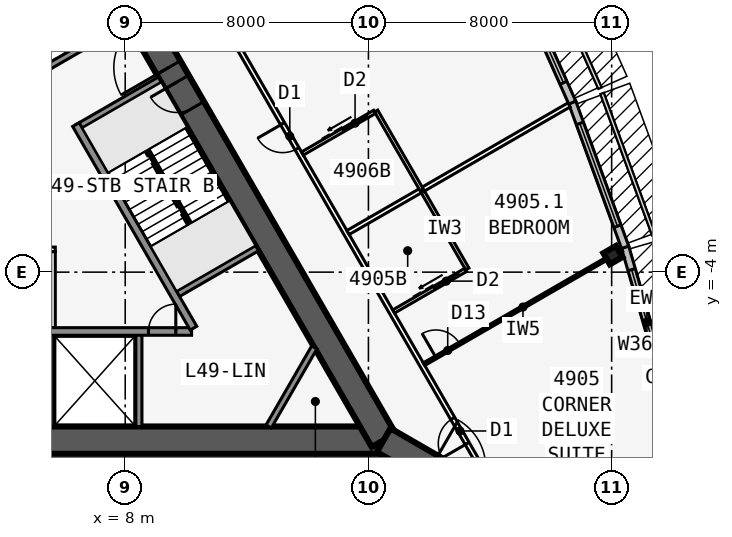
"""IFC4 building model, lengths in metres.
Left out: names, types, materials, properties, quantities, classifications, styles, units other than length and angle.
Written with IfcOpenShell. Run it as: python <this file> out.ifc"""

import sys

from ifc_helpers import new_model, si_unit, direction, frame, frame_2d, origin, origin_2d, place, context, subcontext, project, spatial, rectangle, i_section, extrude, element, fill, save


model = new_model("IFC4")
c1 = context("Model", 3, precision=1e-05, world=origin(), true_north=direction((0.0, 1.0)))
c2 = subcontext(c1, "Body", "Model", "MODEL_VIEW")
j1 = project(units=[si_unit("LENGTHUNIT", "METRE"), si_unit("PLANEANGLEUNIT", "RADIAN")], contexts=[c1])
p1 = place(None, origin())
s1 = spatial("IfcSite", under=j1, at=p1, CompositionType="ELEMENT")
p2 = place(p1, origin())
s2 = spatial("IfcBuilding", under=s1, at=p2, CompositionType="ELEMENT")
p3 = place(p2, frame((0.0, 0.0, 182.7)))
s3 = spatial("IfcBuildingStorey", under=s2, at=p3, CompositionType="ELEMENT", Elevation=182.7)
p4 = place(p3, frame((-16.5, -9.526, 0.0), z_axis=(0.0, 0.0, 1.0), x_axis=(1.0, 0.0, 0.0)))
e1 = element("IfcWall", 1, at=p4, inside=s3, PredefinedType="SHEAR", context=c2, shape_type="SweptSolid", body=[
    extrude(rectangle(XDim=33.0, YDim=0.9, at=frame_2d((16.5, 0.0))), origin(), (0.0, 0.0, 1.0), 3.4),
])
p5 = place(p4, frame((14.05, 0.0, 0.0)))
e2 = element("IfcOpeningElement", 2, at=p5, cuts=e1, PredefinedType="OPENING", context=c2, shape_type="SweptSolid", body=[
    extrude(rectangle(XDim=1.8, YDim=2.13, at=frame_2d((0.9, 1.065))), frame((0.0, 0.46, 0.0), z_axis=(0.0, -1.0, 0.0), x_axis=(1.0, 0.0, 0.0)), (0.0, 0.0, 1.0), 0.92),
])
p6 = place(p3, frame((-0.55, -5.951, 0.0), z_axis=(0.0, 0.0, 1.0), x_axis=(1.0, 0.0, 0.0)))
e3 = element("IfcWall", 3, at=p6, inside=s3, PredefinedType="SOLIDWALL", context=c2, shape_type="SweptSolid", body=[
    extrude(rectangle(XDim=10.733, YDim=0.25, at=frame_2d((5.366, 0.0))), origin(), (0.0, 0.0, 1.0), 3.235),
])
p7 = place(p6, frame((9.314, 0.0, 0.0)))
e4 = element("IfcOpeningElement", 4, at=p7, cuts=e3, PredefinedType="OPENING", context=c2, shape_type="SweptSolid", body=[
    extrude(rectangle(XDim=0.9, YDim=2.13, at=frame_2d((0.45, 1.065))), frame((0.0, 0.135, 0.0), z_axis=(0.0, -1.0, 0.0), x_axis=(1.0, 0.0, 0.0)), (0.0, 0.0, 1.0), 0.27),
])
p8 = place(p6, frame((1.05, 0.0, 0.0)))
e5 = element("IfcOpeningElement", 5, at=p8, cuts=e3, PredefinedType="OPENING", context=c2, shape_type="SweptSolid", body=[
    extrude(rectangle(XDim=1.1, YDim=2.13, at=frame_2d((0.55, 1.065))), frame((0.0, 0.135, 0.0), z_axis=(0.0, -1.0, 0.0), x_axis=(1.0, 0.0, 0.0)), (0.0, 0.0, 1.0), 0.27),
])
p9 = place(p6, frame((4.05, 0.0, 0.0)))
e6 = element("IfcOpeningElement", 6, at=p9, cuts=e3, PredefinedType="OPENING", context=c2, shape_type="SweptSolid", body=[
    extrude(rectangle(XDim=1.1, YDim=2.13, at=frame_2d((0.55, 1.065))), frame((0.0, 0.135, 0.0), z_axis=(0.0, -1.0, 0.0), x_axis=(1.0, 0.0, 0.0)), (0.0, 0.0, 1.0), 0.27),
])
for number, where, z_axis, x_axis in (
    (7, (5.55, -5.951, 0.0), (0.0, 0.0, 1.0), (0.0, -1.0, 0.0)),
    (8, (8.45, -5.951, 0.0), (0.0, 0.0, 1.0), (0.0, -1.0, 0.0)),
):
    element("IfcWall", number, at=place(p3, frame(where, z_axis=z_axis, x_axis=x_axis)), inside=s3, PredefinedType="SOLIDWALL", context=c2, shape_type="SweptSolid", body=[
        extrude(rectangle(XDim=3.125, YDim=0.2, at=frame_2d((1.562, 0.0))), origin(), (0.0, 0.0, 1.0), 3.235),
    ])
p10 = place(p3, frame((16.5, -9.526, 0.0), z_axis=(0.0, 0.0, 1.0), x_axis=(-0.499999749417, 0.866025548458, 0.0)))
e9 = element("IfcWall", 9, at=p10, inside=s3, PredefinedType="SHEAR", context=c2, shape_type="SweptSolid", body=[
    extrude(rectangle(XDim=33.0, YDim=0.9, at=frame_2d((16.5, 0.0))), origin(), (0.0, 0.0, 1.0), 3.4),
])
p11 = place(p10, frame((14.15, 0.0, 0.0)))
e10 = element("IfcOpeningElement", 10, at=p11, cuts=e9, PredefinedType="OPENING", context=c2, shape_type="SweptSolid", body=[
    extrude(rectangle(XDim=1.8, YDim=2.13, at=frame_2d((0.9, 1.065))), frame((0.0, 0.46, 0.0), z_axis=(0.0, -1.0, 0.0), x_axis=(1.0, 0.0, 0.0)), (0.0, 0.0, 1.0), 0.92),
])
p12 = place(p10, frame((12.6, 0.0, 0.0)))
e11 = element("IfcOpeningElement", 11, at=p12, cuts=e9, PredefinedType="OPENING", context=c2, shape_type="SweptSolid", body=[
    extrude(rectangle(XDim=1.0, YDim=2.13, at=frame_2d((0.5, 1.065))), frame((0.0, 0.46, 0.0), z_axis=(0.0, -1.0, 0.0), x_axis=(1.0, 0.0, 0.0)), (0.0, 0.0, 1.0), 0.92),
])
p13 = place(p3, frame((10.245, -5.843, 0.0), z_axis=(0.0, 0.0, 1.0), x_axis=(-0.499993009313, 0.866029439822, 0.0)))
e12 = element("IfcWall", 12, at=p13, inside=s3, PredefinedType="SOLIDWALL", context=c2, shape_type="SweptSolid", body=[
    extrude(rectangle(XDim=7.733, YDim=0.25, at=frame_2d((3.866, 0.0))), origin(), (0.0, 0.0, 1.0), 3.235),
])
for number, where, z_axis, x_axis in (
    (13, (9.629, -4.775, 0.0), (0.0, 0.0, 1.0), (0.866, 0.5, 0.0)),
    (14, (6.429, 0.767, 0.0), (0.0, 0.0, 1.0), (0.866, 0.5, 0.0)),
    (15, (5.329, 2.673, 0.0), (0.0, 0.0, 1.0), (0.866, 0.5, 0.0)),
):
    element("IfcWall", number, at=place(p3, frame(where, z_axis=z_axis, x_axis=x_axis)), inside=s3, PredefinedType="SOLIDWALL", context=c2, shape_type="SweptSolid", body=[
        extrude(rectangle(XDim=3.125, YDim=0.2, at=frame_2d((1.562, 0.0))), origin(), (0.0, 0.0, 1.0), 3.235),
    ])
p14 = place(p3, frame((16.5, -9.526, 0.0), z_axis=(0.0, 0.0, 1.0), x_axis=(0.866031398331, -0.499989616998, 0.0)))
e16 = element("IfcWall", 16, at=p14, inside=s3, PredefinedType="SHEAR", context=c2, shape_type="SweptSolid", body=[
    extrude(rectangle(XDim=4.746, YDim=0.9, at=frame_2d((2.373, 0.0))), origin(), (0.0, 0.0, 1.0), 3.4),
])
p15 = place(p14, frame((1.8, 0.0, 0.0)))
e17 = element("IfcOpeningElement", 17, at=p15, cuts=e16, PredefinedType="OPENING", context=c2, shape_type="SweptSolid", body=[
    extrude(rectangle(XDim=1.8, YDim=2.13, at=frame_2d((0.9, 1.065))), frame((0.0, 0.46, 0.0), z_axis=(0.0, -1.0, 0.0), x_axis=(1.0, 0.0, 0.0)), (0.0, 0.0, 1.0), 0.92),
])
p16 = place(p3, frame((24.041, -3.44, 0.0), z_axis=(0.0, 0.0, 1.0), x_axis=(-0.5, 0.866025403784, 0.0)))
e18 = element("IfcColumn", 18, at=p16, inside=s3, PredefinedType="COLUMN", context=c2, shape_type="SweptSolid", body=[
    extrude(i_section(OverallWidth=0.424, OverallDepth=0.475, WebThickness=0.048, FlangeThickness=0.077, at=origin_2d()), origin(), (0.0, 0.0, 1.0), 3.4),
])
p17 = place(p3, frame((25.88, -8.118, 0.0), z_axis=(0.0, 0.0, 1.0), x_axis=(-0.279528287117, 0.960137457191, 0.0)))
e19 = element("IfcWall", 19, at=p17, inside=s3, PredefinedType="STANDARD", context=c2, shape_type="SweptSolid", body=[
    extrude(rectangle(XDim=5.148, YDim=0.25, at=frame_2d((2.574, 0.0))), origin(), (0.0, 0.0, 1.0), 3.235),
])
p18 = place(p17, frame((0.774, 0.0, 0.45)))
e20 = element("IfcOpeningElement", 20, at=p18, cuts=e19, PredefinedType="OPENING", context=c2, shape_type="SweptSolid", body=[
    extrude(rectangle(XDim=3.6, YDim=2.4, at=frame_2d((1.8, 1.2))), frame((0.0, 0.135, 0.0), z_axis=(0.0, -1.0, 0.0), x_axis=(1.0, 0.0, 0.0)), (0.0, 0.0, 1.0), 0.27),
])
p19 = place(p3, frame((24.444, -3.183, 0.0), z_axis=(0.0, 0.0, 1.0), x_axis=(-0.343225593282, 0.939252996863, 0.0)))
e21 = element("IfcWall", 21, at=p19, inside=s3, PredefinedType="STANDARD", context=c2, shape_type="SweptSolid", body=[
    extrude(rectangle(XDim=5.076, YDim=0.25, at=frame_2d((2.538, 0.0))), origin(), (0.0, 0.0, 1.0), 3.235),
])
p20 = place(p19, frame((0.738, 0.0, 0.45)))
e22 = element("IfcOpeningElement", 22, at=p20, cuts=e21, PredefinedType="OPENING", context=c2, shape_type="SweptSolid", body=[
    extrude(rectangle(XDim=3.6, YDim=2.4, at=frame_2d((1.8, 1.2))), frame((0.0, 0.135, 0.0), z_axis=(0.0, -1.0, 0.0), x_axis=(1.0, 0.0, 0.0)), (0.0, 0.0, 1.0), 0.27),
])
p21 = place(p3, frame((22.705, 1.576, 0.0), z_axis=(0.0, 0.0, 1.0), x_axis=(-0.406832200364, 0.913502906808, 0.0)))
e23 = element("IfcWall", 23, at=p21, inside=s3, PredefinedType="STANDARD", context=c2, shape_type="SweptSolid", body=[
    extrude(rectangle(XDim=5.028, YDim=0.25, at=frame_2d((2.514, 0.0))), origin(), (0.0, 0.0, 1.0), 3.235),
])
p22 = place(p21, frame((0.714, 0.0, 0.45)))
e24 = element("IfcOpeningElement", 24, at=p22, cuts=e23, PredefinedType="OPENING", context=c2, shape_type="SweptSolid", body=[
    extrude(rectangle(XDim=3.6, YDim=2.4, at=frame_2d((1.8, 1.2))), frame((0.0, 0.135, 0.0), z_axis=(0.0, -1.0, 0.0), x_axis=(1.0, 0.0, 0.0)), (0.0, 0.0, 1.0), 0.27),
])
p23 = place(p3, frame((20.027, -10.985, 0.0), z_axis=(0.0, 0.0, 1.0), x_axis=(-0.500001677587, 0.866024435227, 0.0)))
e25 = element("IfcWall", 25, at=p23, inside=s3, PredefinedType="PARTITIONING", context=c2, shape_type="SweptSolid", body=[
    extrude(rectangle(XDim=39.054, YDim=0.15, at=frame_2d((19.527, 0.0))), origin(), (0.0, 0.0, 1.0), 3.235),
])
p24 = place(p23, frame((1.558, 0.0, 0.0)))
e26 = element("IfcOpeningElement", 26, at=p24, cuts=e25, PredefinedType="OPENING", context=c2, shape_type="SweptSolid", body=[
    extrude(rectangle(XDim=0.95, YDim=2.13, at=frame_2d((0.475, 1.065))), frame((0.0, 0.085, 0.0), z_axis=(0.0, -1.0, 0.0), x_axis=(1.0, 0.0, 0.0)), (0.0, 0.0, 1.0), 0.17),
])
p25 = place(p23, frame((12.752, 0.0, 0.0)))
e27 = element("IfcOpeningElement", 27, at=p25, cuts=e25, PredefinedType="OPENING", context=c2, shape_type="SweptSolid", body=[
    extrude(rectangle(XDim=0.95, YDim=2.13, at=frame_2d((0.475, 1.065))), frame((0.0, 0.085, 0.0), z_axis=(0.0, -1.0, 0.0), x_axis=(1.0, 0.0, 0.0)), (0.0, 0.0, 1.0), 0.17),
])
p26 = place(p23, frame((26.552, 0.0, 0.0)))
e28 = element("IfcOpeningElement", 28, at=p26, cuts=e25, PredefinedType="OPENING", context=c2, shape_type="SweptSolid", body=[
    extrude(rectangle(XDim=0.95, YDim=2.13, at=frame_2d((0.475, 1.065))), frame((0.0, 0.085, 0.0), z_axis=(0.0, -1.0, 0.0), x_axis=(1.0, 0.0, 0.0)), (0.0, 0.0, 1.0), 0.17),
])
p27 = place(p23, frame((37.752, 0.0, 0.0)))
e29 = element("IfcOpeningElement", 29, at=p27, cuts=e25, PredefinedType="OPENING", context=c2, shape_type="SweptSolid", body=[
    extrude(rectangle(XDim=0.95, YDim=2.13, at=frame_2d((0.475, 1.065))), frame((0.0, 0.085, 0.0), z_axis=(0.0, -1.0, 0.0), x_axis=(1.0, 0.0, 0.0)), (0.0, 0.0, 1.0), 0.17),
])
p28 = place(p3, frame((17.829, -7.027, 0.0), z_axis=(0.0, 0.0, 1.0), x_axis=(0.866029804378, 0.499992377871, 0.0)))
e30 = element("IfcWall", 30, at=p28, inside=s3, PredefinedType="PARTITIONING", context=c2, shape_type="SweptSolid", body=[
    extrude(rectangle(XDim=7.516, YDim=0.1, at=frame_2d((3.758, 0.0))), origin(), (0.0, 0.0, 1.0), 2.389),
])
p29 = place(p28, frame((0.45, 0.0, 0.0)))
e31 = element("IfcOpeningElement", 31, at=p29, cuts=e30, PredefinedType="OPENING", context=c2, shape_type="SweptSolid", body=[
    extrude(rectangle(XDim=0.9, YDim=2.13, at=frame_2d((0.45, 1.065))), frame((0.0, 0.06, 0.0), z_axis=(0.0, -1.0, 0.0), x_axis=(1.0, 0.0, 0.0)), (0.0, 0.0, 1.0), 0.12),
])
p30 = place(p3, frame((15.329, -2.697, 0.0), z_axis=(0.0, 0.0, 1.0), x_axis=(0.866024316602, 0.50000188305, 0.0)))
e32 = element("IfcWall", 32, at=p30, inside=s3, PredefinedType="PARTITIONING", context=c2, shape_type="SweptSolid", body=[
    extrude(rectangle(XDim=8.395, YDim=0.15, at=frame_2d((4.198, 0.0))), origin(), (0.0, 0.0, 1.0), 2.389),
])
p31 = place(p3, frame((19.253, -3.895, 0.0), z_axis=(0.0, 0.0, 1.0), x_axis=(-0.499990139034, 0.866031096941, 0.0)))
e33 = element("IfcWall", 33, at=p31, inside=s3, PredefinedType="PLUMBINGWALL", context=c2, shape_type="SweptSolid", body=[
    extrude(rectangle(XDim=3.0, YDim=0.12, at=frame_2d((1.5, 0.0))), origin(), (0.0, 0.0, 1.0), 3.235),
])
p32 = place(p3, frame((16.829, -5.295, 0.0), z_axis=(0.0, 0.0, 1.0), x_axis=(0.866035715982, 0.499982138324, 0.0)))
e34 = element("IfcWall", 34, at=p32, inside=s3, PredefinedType="PLUMBINGWALL", context=c2, shape_type="SweptSolid", body=[
    extrude(rectangle(XDim=2.74, YDim=0.12, at=frame_2d((1.37, 0.0))), origin(), (0.0, 0.0, 1.0), 3.235),
])
p33 = place(p32, frame((1.55, 0.0, 0.0)))
e35 = element("IfcOpeningElement", 35, at=p33, cuts=e34, PredefinedType="OPENING", context=c2, shape_type="SweptSolid", body=[
    extrude(rectangle(XDim=0.9, YDim=2.13, at=frame_2d((0.45, 1.065))), frame((0.0, 0.07, 0.0), z_axis=(0.0, -1.0, 0.0), x_axis=(1.0, 0.0, 0.0)), (0.0, 0.0, 1.0), 0.14),
])
p34 = place(p3, frame((17.753, -1.297, 0.0), z_axis=(0.0, 0.0, 1.0), x_axis=(-0.499990139034, 0.866031096941, 0.0)))
e36 = element("IfcWall", 36, at=p34, inside=s3, PredefinedType="PLUMBINGWALL", context=c2, shape_type="SweptSolid", body=[
    extrude(rectangle(XDim=3.0, YDim=0.12, at=frame_2d((1.5, 0.0))), origin(), (0.0, 0.0, 1.0), 3.235),
])
p35 = place(p3, frame((13.829, -0.099, 0.0), z_axis=(0.0, 0.0, 1.0), x_axis=(0.865997131366, 0.500048966069, 0.0)))
e37 = element("IfcWall", 37, at=p35, inside=s3, PredefinedType="PLUMBINGWALL", context=c2, shape_type="SweptSolid", body=[
    extrude(rectangle(XDim=2.74, YDim=0.12, at=frame_2d((1.37, 0.0))), origin(), (0.0, 0.0, 1.0), 3.235),
])
p36 = place(p35, frame((1.55, 0.0, 0.0)))
e38 = element("IfcOpeningElement", 38, at=p36, cuts=e37, PredefinedType="OPENING", context=c2, shape_type="SweptSolid", body=[
    extrude(rectangle(XDim=0.9, YDim=2.13, at=frame_2d((0.45, 1.065))), frame((0.0, 0.07, 0.0), z_axis=(0.0, -1.0, 0.0), x_axis=(1.0, 0.0, 0.0)), (0.0, 0.0, 1.0), 0.14),
])
p37 = place(p3, frame((-2.65, -3.251, 0.0), z_axis=(0.0, 0.0, 1.0), x_axis=(1.0, 0.0, 0.0)))
e39 = element("IfcWall", 39, at=p37, inside=s3, PredefinedType="PARTITIONING", context=c2, shape_type="SweptSolid", body=[
    extrude(rectangle(XDim=8.35, YDim=0.15, at=frame_2d((4.175, 0.0))), origin(), (0.0, 0.0, 1.0), 3.235),
])
p38 = place(p3, frame((5.625, -5.826, 0.0), z_axis=(0.0, 0.0, 1.0), x_axis=(0.0, 1.0, 0.0)))
e40 = element("IfcWall", 40, at=p38, inside=s3, PredefinedType="PARTITIONING", context=c2, shape_type="SweptSolid", body=[
    extrude(rectangle(XDim=2.5, YDim=0.15, at=frame_2d((1.25, 0.0))), origin(), (0.0, 0.0, 1.0), 3.235),
])
p39 = place(p3, frame((14.219, -6.476, 0.0), z_axis=(0.0, 0.0, 1.0), x_axis=(-0.499952404951, -0.866052881055, 0.0)))
e41 = element("IfcWall", 41, at=p39, inside=s3, PredefinedType="SOLIDWALL", context=c2, shape_type="SweptSolid", body=[
    extrude(rectangle(XDim=3.002, YDim=0.2, at=frame_2d((1.501, 0.0))), origin(), (0.0, 0.0, 1.0), 3.235),
])
p40 = place(p3, frame((10.135, -2.401, 0.0), z_axis=(0.0, 0.0, 1.0), x_axis=(-0.499992232847, 0.866029888106, 0.0)))
e42 = element("IfcWall", 42, at=p40, inside=s3, PredefinedType="SOLIDWALL", context=c2, shape_type="SweptSolid", body=[
    extrude(rectangle(XDim=2.794, YDim=0.1, at=frame_2d((1.397, 0.0))), origin(), (0.0, 0.0, 1.0), 3.4),
])
p41 = place(p18, origin())
e43 = element("IfcWindow", 43, at=p41, inside=s3, PartitioningType="SINGLE_PANEL", PredefinedType="WINDOW", context=c2, shape_type="SweptSolid", body=[
    extrude(rectangle(XDim=3.6, YDim=2.4, at=frame_2d((1.8, 1.2))), frame((0.0, 0.03, 0.0), z_axis=(0.0, -1.0, 0.0), x_axis=(1.0, 0.0, 0.0)), (0.0, 0.0, 1.0), 0.06),
])
fill(e20, e43)
p42 = place(p20, origin())
e44 = element("IfcWindow", 44, at=p42, inside=s3, PartitioningType="SINGLE_PANEL", PredefinedType="WINDOW", context=c2, shape_type="SweptSolid", body=[
    extrude(rectangle(XDim=3.6, YDim=2.4, at=frame_2d((1.8, 1.2))), frame((0.0, 0.03, 0.0), z_axis=(0.0, -1.0, 0.0), x_axis=(1.0, 0.0, 0.0)), (0.0, 0.0, 1.0), 0.06),
])
fill(e22, e44)
p43 = place(p22, origin())
e45 = element("IfcWindow", 45, at=p43, inside=s3, PartitioningType="SINGLE_PANEL", PredefinedType="WINDOW", context=c2, shape_type="SweptSolid", body=[
    extrude(rectangle(XDim=3.6, YDim=2.4, at=frame_2d((1.8, 1.2))), frame((0.0, 0.03, 0.0), z_axis=(0.0, -1.0, 0.0), x_axis=(1.0, 0.0, 0.0)), (0.0, 0.0, 1.0), 0.06),
])
fill(e24, e45)
p44 = place(p29, origin())
e46 = element("IfcDoor", 46, at=p44, inside=s3, OperationType="SINGLE_SWING_LEFT", PredefinedType="DOOR", context=c2, shape_type="SweptSolid", body=[
    extrude(rectangle(XDim=0.9, YDim=2.13, at=frame_2d((0.45, 1.065))), frame((0.0, 0.025, 0.0), z_axis=(0.0, -1.0, 0.0), x_axis=(1.0, 0.0, 0.0)), (0.0, 0.0, 1.0), 0.05),
])
fill(e31, e46)
p45 = place(p24, origin())
e47 = element("IfcDoor", 47, at=p45, inside=s3, OperationType="SINGLE_SWING_LEFT", PredefinedType="DOOR", context=c2, shape_type="SweptSolid", body=[
    extrude(rectangle(XDim=0.95, YDim=2.13, at=frame_2d((0.475, 1.065))), frame((0.0, 0.025, 0.0), z_axis=(0.0, -1.0, 0.0), x_axis=(1.0, 0.0, 0.0)), (0.0, 0.0, 1.0), 0.05),
])
fill(e26, e47)
p46 = place(p33, origin())
e48 = element("IfcDoor", 48, at=p46, inside=s3, OperationType="SLIDING_TO_LEFT", PredefinedType="DOOR", context=c2, shape_type="SweptSolid", body=[
    extrude(rectangle(XDim=0.9, YDim=2.13, at=frame_2d((0.45, 1.065))), frame((0.0, 0.025, 0.0), z_axis=(0.0, -1.0, 0.0), x_axis=(1.0, 0.0, 0.0)), (0.0, 0.0, 1.0), 0.05),
])
fill(e35, e48)
p47 = place(p36, origin())
e49 = element("IfcDoor", 49, at=p47, inside=s3, OperationType="SLIDING_TO_LEFT", PredefinedType="DOOR", context=c2, shape_type="SweptSolid", body=[
    extrude(rectangle(XDim=0.9, YDim=2.13, at=frame_2d((0.45, 1.065))), frame((0.0, 0.025, 0.0), z_axis=(0.0, -1.0, 0.0), x_axis=(1.0, 0.0, 0.0)), (0.0, 0.0, 1.0), 0.05),
])
fill(e38, e49)
p48 = place(p25, origin())
e50 = element("IfcDoor", 50, at=p48, inside=s3, OperationType="SINGLE_SWING_RIGHT", PredefinedType="DOOR", context=c2, shape_type="SweptSolid", body=[
    extrude(rectangle(XDim=0.95, YDim=2.13, at=frame_2d((0.475, 1.065))), frame((0.0, 0.025, 0.0), z_axis=(0.0, -1.0, 0.0), x_axis=(1.0, 0.0, 0.0)), (0.0, 0.0, 1.0), 0.05),
])
fill(e27, e50)
p49 = place(p11, origin())
e51 = element("IfcDoor", 51, at=p49, inside=s3, OperationType="DOUBLE_DOOR_SINGLE_SWING", PredefinedType="DOOR", context=c2, shape_type="SweptSolid", body=[
    extrude(rectangle(XDim=1.8, YDim=2.13, at=frame_2d((0.9, 1.065))), frame((0.0, 0.025, 0.0), z_axis=(0.0, -1.0, 0.0), x_axis=(1.0, 0.0, 0.0)), (0.0, 0.0, 1.0), 0.05),
])
fill(e10, e51)
p50 = place(p12, origin())
e52 = element("IfcDoor", 52, at=p50, inside=s3, OperationType="SINGLE_SWING_RIGHT", PredefinedType="DOOR", context=c2, shape_type="SweptSolid", body=[
    extrude(rectangle(XDim=1.0, YDim=2.13, at=frame_2d((0.5, 1.065))), frame((0.0, 0.025, 0.0), z_axis=(0.0, -1.0, 0.0), x_axis=(1.0, 0.0, 0.0)), (0.0, 0.0, 1.0), 0.05),
])
fill(e11, e52)
p51 = place(p7, origin())
e53 = element("IfcDoor", 53, at=p51, inside=s3, OperationType="SINGLE_SWING_RIGHT", PredefinedType="DOOR", context=c2, shape_type="SweptSolid", body=[
    extrude(rectangle(XDim=0.9, YDim=2.13, at=frame_2d((0.45, 1.065))), frame((0.0, 0.025, 0.0), z_axis=(0.0, -1.0, 0.0), x_axis=(1.0, 0.0, 0.0)), (0.0, 0.0, 1.0), 0.05),
])
fill(e4, e53)
save(model, sys.argv[1])
